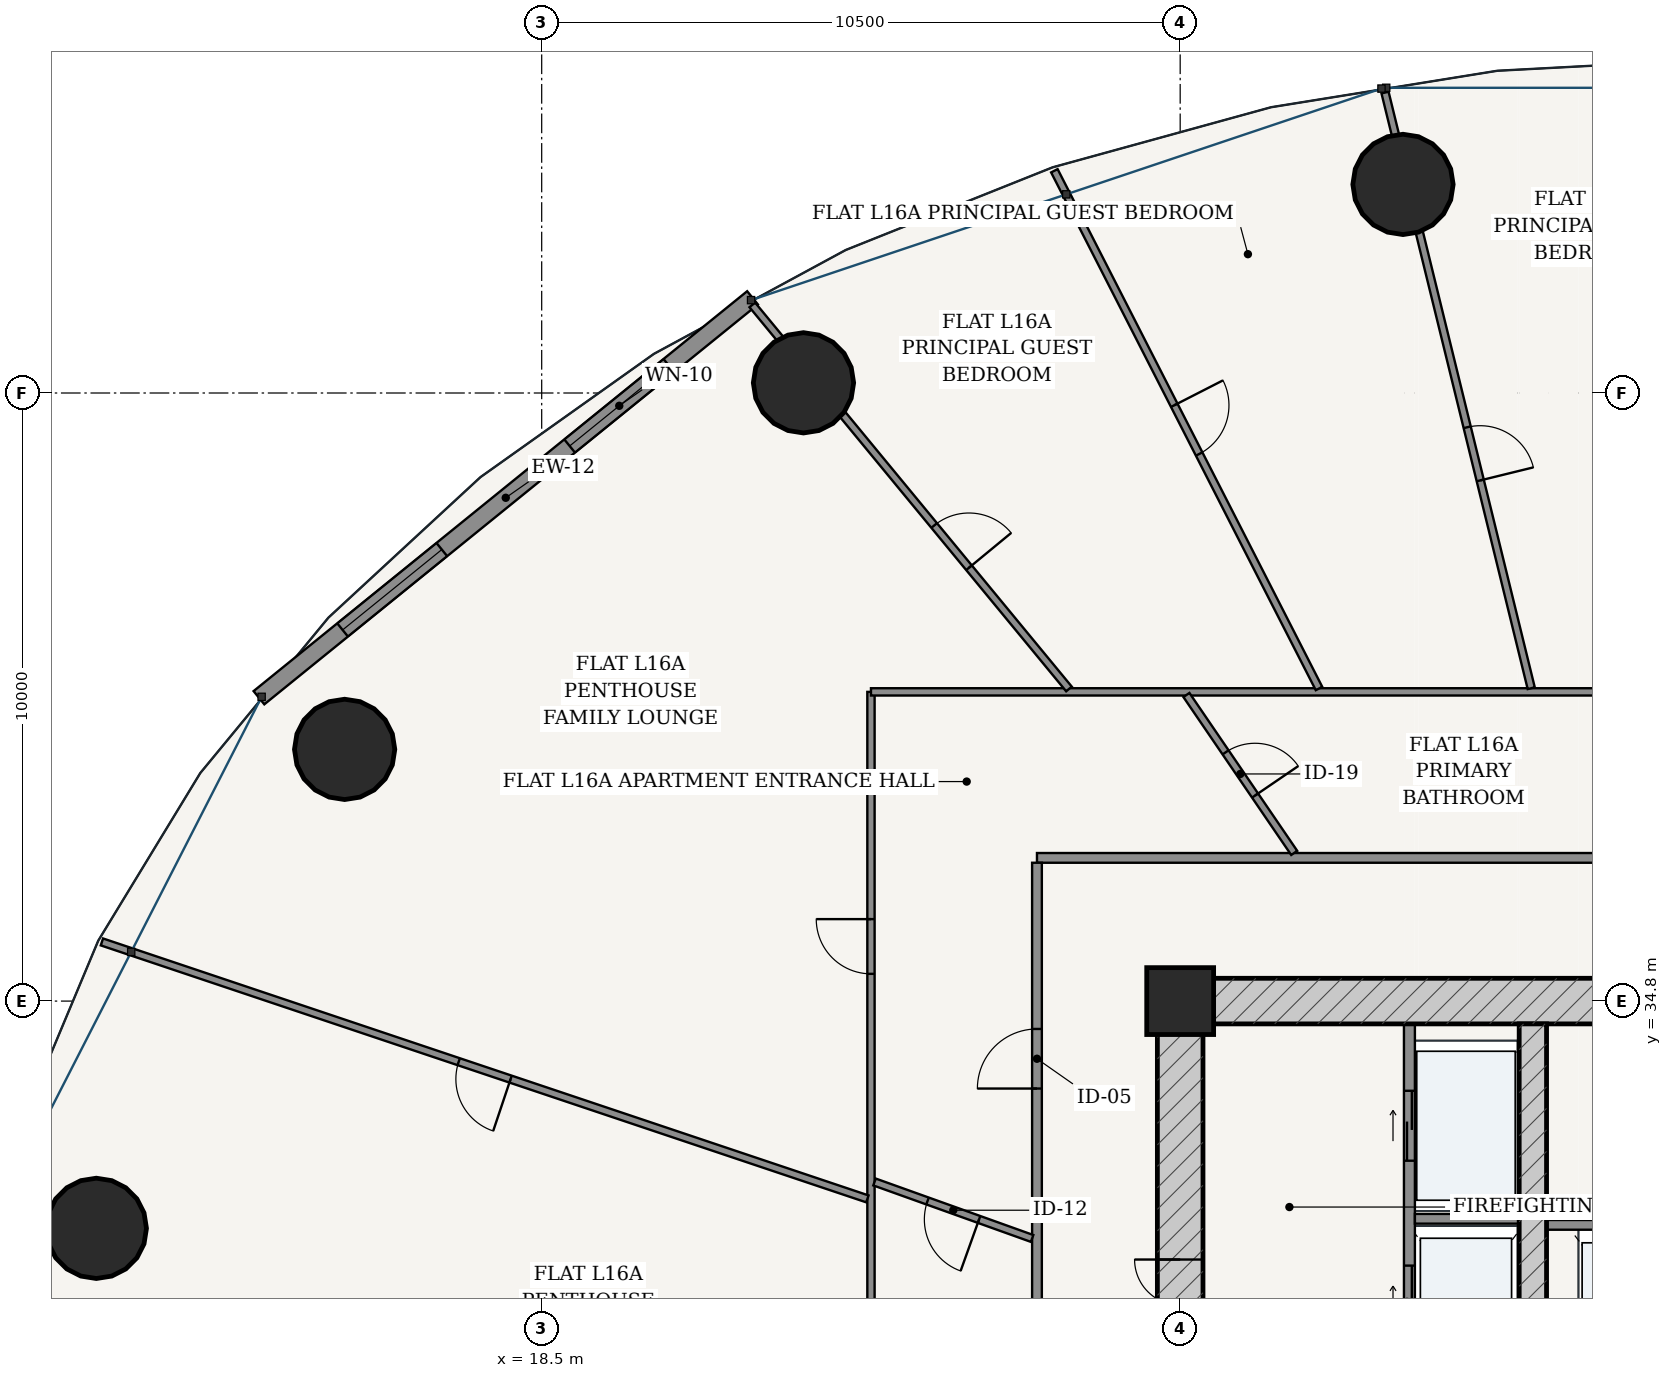
"""IFC4 building model, lengths in metres.
Left out: names, types, materials, properties, quantities, classifications, styles, units other than length and angle.
Written with IfcOpenShell. Run it as: python <this file> out.ifc"""

import sys

from ifc_helpers import new_model, si_unit, direction, frame, frame_2d, origin, origin_2d, place, context, subcontext, project, spatial, rectangle, hollow_circle, extrude, source, transform, mapped, element, fill, save


model = new_model("IFC4")
c1 = context("Model", 3, precision=1e-05, world=origin(), true_north=direction((-0.2419218956, 0.970295726276)))
c2 = subcontext(c1, "Body", "Model", "MODEL_VIEW")
j1 = project(units=[si_unit("LENGTHUNIT", "METRE"), si_unit("PLANEANGLEUNIT", "RADIAN")], contexts=[c1])
p1 = place(None, origin())
s1 = spatial("IfcSite", under=j1, at=p1, CompositionType="ELEMENT")
p2 = place(p1, origin())
s2 = spatial("IfcBuilding", under=s1, at=p2, CompositionType="ELEMENT")
p3 = place(p2, frame((0.0, 0.0, 63.6)))
s3 = spatial("IfcBuildingStorey", under=s2, at=p3, CompositionType="ELEMENT", Elevation=63.6)
p4 = place(p3, frame((29.0, 34.8, 0.0), z_axis=(0.0, 0.0, 1.0), x_axis=(1.0, 0.0, 0.0)))
e1 = element("IfcColumn", 1, at=p4, inside=s3, PredefinedType="COLUMN", context=c2, shape_type="SweptSolid", body=[
    extrude(rectangle(XDim=1.1, YDim=1.1, at=origin_2d()), origin(), (0.0, 0.0, 1.0), 3.6),
])
p5 = place(p3, frame((28.625, 34.8, 0.0), z_axis=(0.0, 0.0, 1.0), x_axis=(1.0, 0.0, 0.0)))
e2 = element("IfcWall", 2, at=p5, inside=s3, PredefinedType="SHEAR", context=c2, shape_type="SweptSolid", body=[
    extrude(rectangle(XDim=18.75, YDim=0.75, at=frame_2d((9.375, 0.0))), origin(), (0.0, 0.0, 1.0), 3.32),
])
p6 = place(p5, frame((8.95, 0.0, 0.0)))
e3 = element("IfcOpeningElement", 3, at=p6, cuts=e2, PredefinedType="OPENING", context=c2, shape_type="SweptSolid", body=[
    extrude(rectangle(XDim=0.85, YDim=2.1, at=frame_2d((0.425, 1.05))), frame((0.0, 0.385, 0.0), z_axis=(0.0, -1.0, 0.0), x_axis=(1.0, 0.0, 0.0)), (0.0, 0.0, 1.0), 0.77),
])
p7 = place(p3, frame((29.0, 19.175, 0.0), z_axis=(0.0, 0.0, 1.0), x_axis=(0.0, 1.0, 0.0)))
e4 = element("IfcWall", 4, at=p7, inside=s3, PredefinedType="SHEAR", context=c2, shape_type="SweptSolid", body=[
    extrude(rectangle(XDim=15.25, YDim=0.75, at=frame_2d((7.625, 0.0))), origin(), (0.0, 0.0, 1.0), 3.32),
])
p8 = place(p7, frame((9.875, 0.0, 0.0)))
e5 = element("IfcOpeningElement", 5, at=p8, cuts=e4, PredefinedType="OPENING", context=c2, shape_type="SweptSolid", body=[
    extrude(rectangle(XDim=1.5, YDim=2.2, at=frame_2d((0.75, 1.1))), frame((0.0, 0.385, 0.0), z_axis=(0.0, -1.0, 0.0), x_axis=(1.0, 0.0, 0.0)), (0.0, 0.0, 1.0), 0.77),
])
p9 = place(p3, frame((34.8, 19.175, 0.0), z_axis=(0.0, 0.0, 1.0), x_axis=(0.0, 1.0, 0.0)))
e6 = element("IfcWall", 6, at=p9, inside=s3, PredefinedType="SHEAR", context=c2, shape_type="SweptSolid", body=[
    extrude(rectangle(XDim=15.25, YDim=0.45, at=frame_2d((7.625, 0.0))), origin(), (0.0, 0.0, 1.0), 3.32),
])
p10 = place(p9, frame((7.8, 0.0, 0.0)))
e7 = element("IfcOpeningElement", 7, at=p10, cuts=e6, PredefinedType="OPENING", context=c2, shape_type="SweptSolid", body=[
    extrude(rectangle(XDim=1.05, YDim=2.15, at=frame_2d((0.525, 1.075))), frame((0.0, 0.235, 0.0), z_axis=(0.0, -1.0, 0.0), x_axis=(1.0, 0.0, 0.0)), (0.0, 0.0, 1.0), 0.47),
])
for number, where, z_axis, x_axis in (
    (8, (32.664, 48.23, 0.0), (0.0, 0.0, 1.0), (1.0, 0.0, 0.0)),
    (9, (22.805, 44.968, 0.0), (0.0, 0.0, 1.0), (1.0, 0.0, 0.0)),
    (10, (15.259, 38.939, 0.0), (0.0, 0.0, 1.0), (1.0, 0.0, 0.0)),
    (11, (11.176, 31.063, 0.0), (0.0, 0.0, 1.0), (1.0, 0.0, 0.0)),
):
    element("IfcColumn", number, at=place(p3, frame(where, z_axis=z_axis, x_axis=x_axis)), inside=s3, PredefinedType="COLUMN", context=c2, shape_type="SweptSolid", body=[
        extrude(hollow_circle(Radius=0.825, WallThickness=0.05, at=origin_2d()), origin(), (0.0, 0.0, 1.0), 3.6),
    ])
p11 = place(p3, frame((21.967, 46.365, 0.0), z_axis=(0.0, 0.0, 1.0), x_axis=(-0.777005352078, -0.62949398952, 0.0)))
e12 = element("IfcWall", 12, at=p11, inside=s3, PredefinedType="SOLIDWALL", context=c2, shape_type="SweptSolid", body=[
    extrude(rectangle(XDim=10.447, YDim=0.28, at=frame_2d((5.223, 0.0))), origin(), (0.0, 0.0, 1.0), 3.32),
])
p12 = place(p11, frame((1.771, 0.0, 0.85)))
e13 = element("IfcOpeningElement", 13, at=p12, cuts=e12, PredefinedType="OPENING", context=c2, shape_type="SweptSolid", body=[
    extrude(rectangle(XDim=2.1, YDim=1.95, at=frame_2d((1.05, 0.975))), frame((0.0, 0.15, 0.0), z_axis=(0.0, -1.0, 0.0), x_axis=(1.0, 0.0, 0.0)), (0.0, 0.0, 1.0), 0.3),
])
p13 = place(p11, frame((6.576, 0.0, 0.85)))
e14 = element("IfcOpeningElement", 14, at=p13, cuts=e12, PredefinedType="OPENING", context=c2, shape_type="SweptSolid", body=[
    extrude(rectangle(XDim=2.1, YDim=1.95, at=frame_2d((1.05, 0.975))), frame((0.0, 0.15, 0.0), z_axis=(0.0, -1.0, 0.0), x_axis=(1.0, 0.0, 0.0)), (0.0, 0.0, 1.0), 0.3),
])
p14 = place(p3, frame((32.77, 28.52, 0.0), z_axis=(0.0, 0.0, 1.0), x_axis=(0.0, 1.0, 0.0)))
e15 = element("IfcWall", 15, at=p14, inside=s3, PredefinedType="PARTITIONING", context=c2, shape_type="SweptSolid", body=[
    extrude(rectangle(XDim=5.905, YDim=0.18, at=frame_2d((2.953, 0.0))), origin(), (0.0, 0.0, 1.0), 3.32),
])
p15 = place(p14, frame((3.655, 0.0, 0.0)))
e16 = element("IfcOpeningElement", 16, at=p15, cuts=e15, PredefinedType="OPENING", context=c2, shape_type="SweptSolid", body=[
    extrude(rectangle(XDim=1.15, YDim=2.2, at=frame_2d((0.575, 1.1))), frame((0.0, 0.1, 0.0), z_axis=(0.0, -1.0, 0.0), x_axis=(1.0, 0.0, 0.0)), (0.0, 0.0, 1.0), 0.2),
])
p16 = place(p14, frame((0.73, 0.0, 0.0)))
e17 = element("IfcOpeningElement", 17, at=p16, cuts=e15, PredefinedType="OPENING", context=c2, shape_type="SweptSolid", body=[
    extrude(rectangle(XDim=1.2, YDim=2.25, at=frame_2d((0.6, 1.125))), frame((0.0, 0.1, 0.0), z_axis=(0.0, -1.0, 0.0), x_axis=(1.0, 0.0, 0.0)), (0.0, 0.0, 1.0), 0.2),
])
p17 = place(p3, frame((32.86, 31.22, 0.0), z_axis=(0.0, 0.0, 1.0), x_axis=(1.0, 0.0, 0.0)))
e18 = element("IfcWall", 18, at=p17, inside=s3, PredefinedType="PARTITIONING", context=c2, shape_type="SweptSolid", body=[
    extrude(rectangle(XDim=1.715, YDim=0.16, at=frame_2d((0.857, 0.0))), origin(), (0.0, 0.0, 1.0), 3.32),
])
p18 = place(p3, frame((35.025, 31.12, 0.0), z_axis=(0.0, 0.0, 1.0), x_axis=(1.0, 0.0, 0.0)))
e19 = element("IfcWall", 19, at=p18, inside=s3, PredefinedType="PARTITIONING", context=c2, shape_type="SweptSolid", body=[
    extrude(rectangle(XDim=5.95, YDim=0.16, at=frame_2d((2.975, 0.0))), origin(), (0.0, 0.0, 1.0), 3.32),
])
p19 = place(p3, frame((26.645, 37.155, 0.0), z_axis=(0.0, 0.0, 1.0), x_axis=(1.0, 0.0, 0.0)))
e20 = element("IfcWall", 20, at=p19, inside=s3, PredefinedType="PARTITIONING", context=c2, shape_type="SweptSolid", body=[
    extrude(rectangle(XDim=22.71, YDim=0.16, at=frame_2d((11.355, 0.0))), origin(), (0.0, 0.0, 1.0), 2.688),
])
p20 = place(p3, frame((26.645, 16.525, 0.0), z_axis=(0.0, 0.0, 1.0), x_axis=(0.0, 1.0, 0.0)))
e21 = element("IfcWall", 21, at=p20, inside=s3, PredefinedType="PARTITIONING", context=c2, shape_type="SweptSolid", body=[
    extrude(rectangle(XDim=20.55, YDim=0.16, at=frame_2d((10.275, 0.0))), origin(), (0.0, 0.0, 1.0), 2.688),
])
p21 = place(p20, frame((16.837, 0.0, 0.0)))
e22 = element("IfcOpeningElement", 22, at=p21, cuts=e21, PredefinedType="OPENING", context=c2, shape_type="SweptSolid", body=[
    extrude(rectangle(XDim=0.98, YDim=2.2, at=frame_2d((0.49, 1.1))), frame((0.0, 0.09, 0.0), z_axis=(0.0, -1.0, 0.0), x_axis=(1.0, 0.0, 0.0)), (0.0, 0.0, 1.0), 0.18),
])
p22 = place(p3, frame((23.915, 19.276, 0.0), z_axis=(0.0, 0.0, 1.0), x_axis=(0.0, 1.0, 0.0)))
e23 = element("IfcWall", 23, at=p22, inside=s3, PredefinedType="PARTITIONING", context=c2, shape_type="SweptSolid", body=[
    extrude(rectangle(XDim=20.609, YDim=0.12, at=frame_2d((10.305, 0.0))), origin(), (0.0, 0.0, 1.0), 2.688),
])
p23 = place(p22, frame((15.972, 0.0, 0.0)))
e24 = element("IfcOpeningElement", 24, at=p23, cuts=e23, PredefinedType="OPENING", context=c2, shape_type="SweptSolid", body=[
    extrude(rectangle(XDim=0.9, YDim=2.15, at=frame_2d((0.45, 1.075))), frame((0.0, 0.07, 0.0), z_axis=(0.0, -1.0, 0.0), x_axis=(1.0, 0.0, 0.0)), (0.0, 0.0, 1.0), 0.14),
])
p24 = place(p22, frame((3.058, 0.0, 0.0)))
e25 = element("IfcOpeningElement", 25, at=p24, cuts=e23, PredefinedType="OPENING", context=c2, shape_type="SweptSolid", body=[
    extrude(rectangle(XDim=0.9, YDim=2.15, at=frame_2d((0.45, 1.075))), frame((0.0, 0.07, 0.0), z_axis=(0.0, -1.0, 0.0), x_axis=(1.0, 0.0, 0.0)), (0.0, 0.0, 1.0), 0.14),
])
p25 = place(p3, frame((23.915, 39.885, 0.0), z_axis=(0.0, 0.0, 1.0), x_axis=(1.0, 0.0, 0.0)))
e26 = element("IfcWall", 26, at=p25, inside=s3, PredefinedType="PARTITIONING", context=c2, shape_type="SweptSolid", body=[
    extrude(rectangle(XDim=28.17, YDim=0.12, at=frame_2d((14.085, 0.0))), origin(), (0.0, 0.0, 1.0), 2.688),
])
p26 = place(p25, frame((12.891, 0.0, 0.0)))
e27 = element("IfcOpeningElement", 27, at=p26, cuts=e26, PredefinedType="OPENING", context=c2, shape_type="SweptSolid", body=[
    extrude(rectangle(XDim=0.9, YDim=2.15, at=frame_2d((0.45, 1.075))), frame((0.0, 0.07, 0.0), z_axis=(0.0, -1.0, 0.0), x_axis=(1.0, 0.0, 0.0)), (0.0, 0.0, 1.0), 0.14),
])
p27 = place(p3, frame((34.773, 39.945, 0.0), z_axis=(0.0, 0.0, 1.0), x_axis=(-0.238375747469, 0.97117300365, 0.0)))
e28 = element("IfcWall", 28, at=p27, inside=s3, PredefinedType="PARTITIONING", context=c2, shape_type="SweptSolid", body=[
    extrude(rectangle(XDim=10.086, YDim=0.12, at=frame_2d((5.043, 0.0))), origin(), (0.0, 0.0, 1.0), 2.688),
])
p28 = place(p27, frame((3.519, 0.0, 0.0)))
e29 = element("IfcOpeningElement", 29, at=p28, cuts=e28, PredefinedType="OPENING", context=c2, shape_type="SweptSolid", body=[
    extrude(rectangle(XDim=0.9, YDim=2.15, at=frame_2d((0.45, 1.075))), frame((0.0, 0.07, 0.0), z_axis=(0.0, -1.0, 0.0), x_axis=(1.0, 0.0, 0.0)), (0.0, 0.0, 1.0), 0.14),
])
p29 = place(p3, frame((31.283, 39.94, 0.0), z_axis=(0.0, 0.0, 1.0), x_axis=(-0.455131303234, 0.890424335256, 0.0)))
e30 = element("IfcWall", 30, at=p29, inside=s3, PredefinedType="PARTITIONING", context=c2, shape_type="SweptSolid", body=[
    extrude(rectangle(XDim=9.562, YDim=0.12, at=frame_2d((4.781, 0.0))), origin(), (0.0, 0.0, 1.0), 2.762),
])
p30 = place(p29, frame((4.331, 0.0, 0.0)))
e31 = element("IfcOpeningElement", 31, at=p30, cuts=e30, PredefinedType="OPENING", context=c2, shape_type="SweptSolid", body=[
    extrude(rectangle(XDim=0.9, YDim=2.15, at=frame_2d((0.45, 1.075))), frame((0.0, 0.07, 0.0), z_axis=(0.0, -1.0, 0.0), x_axis=(1.0, 0.0, 0.0)), (0.0, 0.0, 1.0), 0.14),
])
p31 = place(p3, frame((27.171, 39.933, 0.0), z_axis=(0.0, 0.0, 1.0), x_axis=(-0.636192172227, 0.771530634516, 0.0)))
e32 = element("IfcWall", 32, at=p31, inside=s3, PredefinedType="PARTITIONING", context=c2, shape_type="SweptSolid", body=[
    extrude(rectangle(XDim=8.186, YDim=0.12, at=frame_2d((4.093, 0.0))), origin(), (0.0, 0.0, 1.0), 2.688),
])
p32 = place(p31, frame((2.584, 0.0, 0.0)))
e33 = element("IfcOpeningElement", 33, at=p32, cuts=e32, PredefinedType="OPENING", context=c2, shape_type="SweptSolid", body=[
    extrude(rectangle(XDim=0.9, YDim=2.15, at=frame_2d((0.45, 1.075))), frame((0.0, 0.07, 0.0), z_axis=(0.0, -1.0, 0.0), x_axis=(1.0, 0.0, 0.0)), (0.0, 0.0, 1.0), 0.14),
])
p33 = place(p3, frame((23.856, 31.547, 0.0), z_axis=(0.0, 0.0, 1.0), x_axis=(-0.948017487737, 0.318218231634, 0.0)))
e34 = element("IfcWall", 34, at=p33, inside=s3, PredefinedType="PARTITIONING", context=c2, shape_type="SweptSolid", body=[
    extrude(rectangle(XDim=13.279, YDim=0.12, at=frame_2d((6.639, 0.0))), origin(), (0.0, 0.0, 1.0), 2.762),
])
p34 = place(p33, frame((6.189, 0.0, 0.0)))
e35 = element("IfcOpeningElement", 35, at=p34, cuts=e34, PredefinedType="OPENING", context=c2, shape_type="SweptSolid", body=[
    extrude(rectangle(XDim=0.9, YDim=2.15, at=frame_2d((0.45, 1.075))), frame((0.0, 0.07, 0.0), z_axis=(0.0, -1.0, 0.0), x_axis=(1.0, 0.0, 0.0)), (0.0, 0.0, 1.0), 0.14),
])
p35 = place(p3, frame((30.875, 37.237, 0.0), z_axis=(0.0, 0.0, 1.0), x_axis=(-0.563751131022, 0.825944708967, 0.0)))
e36 = element("IfcWall", 36, at=p35, inside=s3, PredefinedType="PARTITIONING", context=c2, shape_type="SweptSolid", body=[
    extrude(rectangle(XDim=3.145, YDim=0.12, at=frame_2d((1.572, 0.0))), origin(), (0.0, 0.0, 1.0), 3.32),
])
p36 = place(p35, frame((1.142, 0.0, 0.0)))
e37 = element("IfcOpeningElement", 37, at=p36, cuts=e36, PredefinedType="OPENING", context=c2, shape_type="SweptSolid", body=[
    extrude(rectangle(XDim=0.86, YDim=2.15, at=frame_2d((0.43, 1.075))), frame((0.0, 0.07, 0.0), z_axis=(0.0, -1.0, 0.0), x_axis=(1.0, 0.0, 0.0)), (0.0, 0.0, 1.0), 0.14),
])
p37 = place(p3, frame((26.565, 30.896, 0.0), z_axis=(0.0, 0.0, 1.0), x_axis=(-0.941406362049, 0.337274460186, 0.0)))
e38 = element("IfcWall", 38, at=p37, inside=s3, PredefinedType="PARTITIONING", context=c2, shape_type="SweptSolid", body=[
    extrude(rectangle(XDim=2.753, YDim=0.12, at=frame_2d((1.376, 0.0))), origin(), (0.0, 0.0, 1.0), 3.32),
])
p38 = place(p37, frame((0.927, 0.0, 0.0)))
e39 = element("IfcOpeningElement", 39, at=p38, cuts=e38, PredefinedType="OPENING", context=c2, shape_type="SweptSolid", body=[
    extrude(rectangle(XDim=0.9, YDim=2.15, at=frame_2d((0.45, 1.075))), frame((0.0, 0.07, 0.0), z_axis=(0.0, -1.0, 0.0), x_axis=(1.0, 0.0, 0.0)), (0.0, 0.0, 1.0), 0.14),
])
m1 = source(origin(), c2, "Body", "SweptSolid", [
    extrude(rectangle(XDim=2.1, YDim=1.95, at=frame_2d((1.05, 0.975))), frame((0.0, 0.03, 0.0), z_axis=(0.0, -1.0, 0.0), x_axis=(1.0, 0.0, 0.0)), (0.0, 0.0, 1.0), 0.06),
])
p39 = place(p12, origin())
e40 = element("IfcWindow", 40, at=p39, inside=s3, PartitioningType="SINGLE_PANEL", PredefinedType="WINDOW", context=c2, shape_type="MappedRepresentation", body=[
    mapped(m1, transform((0.0, 0.0, 0.0), scale=1.0)),
])
fill(e13, e40)
p40 = place(p13, origin())
e41 = element("IfcWindow", 41, at=p40, inside=s3, PartitioningType="SINGLE_PANEL", PredefinedType="WINDOW", context=c2, shape_type="MappedRepresentation", body=[
    mapped(m1, transform((0.0, 0.0, 0.0), scale=1.0)),
])
fill(e14, e41)
m2 = source(origin(), c2, "Body", "SweptSolid", [
    extrude(rectangle(XDim=1.5, YDim=2.2, at=frame_2d((0.75, 1.1))), frame((0.0, 0.025, 0.0), z_axis=(0.0, -1.0, 0.0), x_axis=(1.0, 0.0, 0.0)), (0.0, 0.0, 1.0), 0.05),
])
p41 = place(p8, origin())
e42 = element("IfcDoor", 42, at=p41, inside=s3, OperationType="DOUBLE_DOOR_SINGLE_SWING", PredefinedType="DOOR", context=c2, shape_type="MappedRepresentation", body=[
    mapped(m2, transform((0.0, 0.0, 0.0), scale=1.0)),
])
fill(e5, e42)
m3 = source(origin(), c2, "Body", "SweptSolid", [
    extrude(rectangle(XDim=1.15, YDim=2.2, at=frame_2d((0.575, 1.1))), frame((0.0, 0.025, 0.0), z_axis=(0.0, -1.0, 0.0), x_axis=(1.0, 0.0, 0.0)), (0.0, 0.0, 1.0), 0.05),
])
p42 = place(p15, origin())
e43 = element("IfcDoor", 43, at=p42, inside=s3, OperationType="DOUBLE_DOOR_SLIDING", PredefinedType="DOOR", context=c2, shape_type="MappedRepresentation", body=[
    mapped(m3, transform((0.0, 0.0, 0.0), scale=1.0)),
])
fill(e16, e43)
m4 = source(origin(), c2, "Body", "SweptSolid", [
    extrude(rectangle(XDim=1.2, YDim=2.25, at=frame_2d((0.6, 1.125))), frame((0.0, 0.025, 0.0), z_axis=(0.0, -1.0, 0.0), x_axis=(1.0, 0.0, 0.0)), (0.0, 0.0, 1.0), 0.05),
])
p43 = place(p16, origin())
e44 = element("IfcDoor", 44, at=p43, inside=s3, OperationType="DOUBLE_DOOR_SLIDING", PredefinedType="DOOR", context=c2, shape_type="MappedRepresentation", body=[
    mapped(m4, transform((0.0, 0.0, 0.0), scale=1.0)),
])
fill(e17, e44)
m5 = source(origin(), c2, "Body", "SweptSolid", [
    extrude(rectangle(XDim=0.98, YDim=2.2, at=frame_2d((0.49, 1.1))), frame((0.0, 0.025, 0.0), z_axis=(0.0, -1.0, 0.0), x_axis=(1.0, 0.0, 0.0)), (0.0, 0.0, 1.0), 0.05),
])
p44 = place(p21, origin())
e45 = element("IfcDoor", 45, at=p44, inside=s3, OperationType="SINGLE_SWING_LEFT", PredefinedType="DOOR", context=c2, shape_type="MappedRepresentation", body=[
    mapped(m5, transform((0.0, 0.0, 0.0), scale=1.0)),
])
fill(e22, e45)
m6 = source(origin(), c2, "Body", "SweptSolid", [
    extrude(rectangle(XDim=0.86, YDim=2.15, at=frame_2d((0.43, 1.075))), frame((0.0, 0.025, 0.0), z_axis=(0.0, -1.0, 0.0), x_axis=(1.0, 0.0, 0.0)), (0.0, 0.0, 1.0), 0.05),
])
p45 = place(p36, frame((0.86, 0.0, 0.0), z_axis=(0.0, 0.0, 1.0), x_axis=(-1.0, 0.0, 0.0)))
e46 = element("IfcDoor", 46, at=p45, inside=s3, OperationType="SINGLE_SWING_RIGHT", PredefinedType="DOOR", context=c2, shape_type="MappedRepresentation", body=[
    mapped(m6, transform((0.0, 0.0, 0.0), scale=1.0)),
])
fill(e37, e46)
m7 = source(origin(), c2, "Body", "SweptSolid", [
    extrude(rectangle(XDim=0.9, YDim=2.15, at=frame_2d((0.45, 1.075))), frame((0.0, 0.025, 0.0), z_axis=(0.0, -1.0, 0.0), x_axis=(1.0, 0.0, 0.0)), (0.0, 0.0, 1.0), 0.05),
])
p46 = place(p38, origin())
e47 = element("IfcDoor", 47, at=p46, inside=s3, OperationType="SINGLE_SWING_LEFT", PredefinedType="DOOR", context=c2, shape_type="MappedRepresentation", body=[
    mapped(m7, transform((0.0, 0.0, 0.0), scale=1.0)),
])
fill(e39, e47)
p47 = place(p23, origin())
e48 = element("IfcDoor", 48, at=p47, inside=s3, OperationType="SINGLE_SWING_RIGHT", PredefinedType="DOOR", context=c2, shape_type="MappedRepresentation", body=[
    mapped(m7, transform((0.0, 0.0, 0.0), scale=1.0)),
])
fill(e24, e48)
p48 = place(p34, origin())
e49 = element("IfcDoor", 49, at=p48, inside=s3, OperationType="SINGLE_SWING_LEFT", PredefinedType="DOOR", context=c2, shape_type="MappedRepresentation", body=[
    mapped(m7, transform((0.0, 0.0, 0.0), scale=1.0)),
])
fill(e35, e49)
p49 = place(p32, frame((0.9, 0.0, 0.0), z_axis=(0.0, 0.0, 1.0), x_axis=(-1.0, 0.0, 0.0)))
e50 = element("IfcDoor", 50, at=p49, inside=s3, OperationType="SINGLE_SWING_RIGHT", PredefinedType="DOOR", context=c2, shape_type="MappedRepresentation", body=[
    mapped(m7, transform((0.0, 0.0, 0.0), scale=1.0)),
])
fill(e33, e50)
p50 = place(p30, frame((0.9, 0.0, 0.0), z_axis=(0.0, 0.0, 1.0), x_axis=(-1.0, 0.0, 0.0)))
e51 = element("IfcDoor", 51, at=p50, inside=s3, OperationType="SINGLE_SWING_LEFT", PredefinedType="DOOR", context=c2, shape_type="MappedRepresentation", body=[
    mapped(m7, transform((0.0, 0.0, 0.0), scale=1.0)),
])
fill(e31, e51)
p51 = place(p28, frame((0.9, 0.0, 0.0), z_axis=(0.0, 0.0, 1.0), x_axis=(-1.0, 0.0, 0.0)))
e52 = element("IfcDoor", 52, at=p51, inside=s3, OperationType="SINGLE_SWING_RIGHT", PredefinedType="DOOR", context=c2, shape_type="MappedRepresentation", body=[
    mapped(m7, transform((0.0, 0.0, 0.0), scale=1.0)),
])
fill(e29, e52)
save(model, sys.argv[1])
